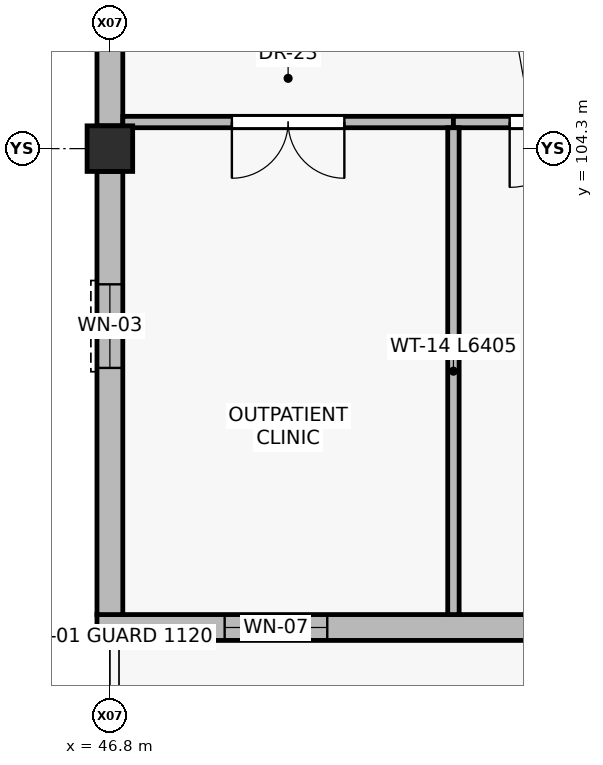
"""IFC4 building model, lengths in metres.
Left out: names, types, materials, properties, quantities, classifications, styles, units other than length and angle.
Written with IfcOpenShell. Run it as: python <this file> out.ifc"""

import sys

from ifc_helpers import new_model, si_unit, direction, frame, frame_2d, origin, origin_2d, place, context, subcontext, project, spatial, rectangle, extrude, element, fill, save


model = new_model("IFC4")
c1 = context("Model", 3, precision=1e-05, world=origin(), true_north=direction((0.0, 1.0)))
c2 = subcontext(c1, "Body", "Model", "MODEL_VIEW")
j1 = project(units=[si_unit("LENGTHUNIT", "METRE"), si_unit("PLANEANGLEUNIT", "RADIAN")], contexts=[c1])
p1 = place(None, origin())
s1 = spatial("IfcSite", under=j1, at=p1, CompositionType="ELEMENT")
p2 = place(p1, origin())
s2 = spatial("IfcBuilding", under=s1, at=p2, CompositionType="ELEMENT")
p3 = place(p2, frame((0.0, 0.0, 4.8)))
s3 = spatial("IfcBuildingStorey", under=s2, at=p3, CompositionType="ELEMENT", Elevation=4.8)
p4 = place(p3, frame((46.8, 104.3, 0.0), z_axis=(0.0, 0.0, 1.0), x_axis=(1.0, 0.0, 0.0)))
e1 = element("IfcColumn", 1, at=p4, inside=s3, PredefinedType="COLUMN", context=c2, shape_type="SweptSolid", body=[
    extrude(rectangle(XDim=0.6, YDim=0.6, at=origin_2d()), origin(), (0.0, 0.0, 1.0), 4.8),
])
p5 = place(p3, frame((54.6, 98.0, 0.0), z_axis=(0.0, 0.0, 1.0), x_axis=(-1.0, 0.0, 0.0)))
e2 = element("IfcWall", 2, at=p5, inside=s3, PredefinedType="STANDARD", context=c2, shape_type="SweptSolid", body=[
    extrude(rectangle(XDim=7.97, YDim=0.34, at=frame_2d((3.985, 0.0))), origin(), (0.0, 0.0, 1.0), 4.54),
])
p6 = place(p5, frame((1.05, 0.0, 0.9)))
e3 = element("IfcOpeningElement", 3, at=p6, cuts=e2, PredefinedType="OPENING", context=c2, shape_type="SweptSolid", body=[
    extrude(rectangle(XDim=1.2, YDim=2.1, at=frame_2d((0.6, 1.05))), frame((0.0, 0.18, 0.0), z_axis=(0.0, -1.0, 0.0), x_axis=(1.0, 0.0, 0.0)), (0.0, 0.0, 1.0), 0.36),
])
p7 = place(p5, frame((4.94, 0.0, 0.9)))
e4 = element("IfcOpeningElement", 4, at=p7, cuts=e2, PredefinedType="OPENING", context=c2, shape_type="SweptSolid", body=[
    extrude(rectangle(XDim=1.35, YDim=1.75, at=frame_2d((0.675, 0.875))), frame((0.0, 0.18, 0.0), z_axis=(0.0, -1.0, 0.0), x_axis=(1.0, 0.0, 0.0)), (0.0, 0.0, 1.0), 0.36),
])
p8 = place(p3, frame((46.8, 98.17, 0.0), z_axis=(0.0, 0.0, 1.0), x_axis=(0.0, 1.0, 0.0)))
e5 = element("IfcWall", 5, at=p8, inside=s3, PredefinedType="STANDARD", context=c2, shape_type="SweptSolid", body=[
    extrude(rectangle(XDim=5.83, YDim=0.34, at=frame_2d((2.915, 0.0))), origin(), (0.0, 0.0, 1.0), 4.14),
])
p9 = place(p8, frame((3.245, 0.0, 0.9)))
e6 = element("IfcOpeningElement", 6, at=p9, cuts=e5, PredefinedType="OPENING", context=c2, shape_type="SweptSolid", body=[
    extrude(rectangle(XDim=1.1, YDim=1.6, at=frame_2d((0.55, 0.8))), frame((0.0, 0.18, 0.0), z_axis=(0.0, -1.0, 0.0), x_axis=(1.0, 0.0, 0.0)), (0.0, 0.0, 1.0), 0.36),
])
p10 = place(p3, frame((46.8, 104.6, 0.0), z_axis=(0.0, 0.0, 1.0), x_axis=(0.0, 1.0, 0.0)))
e7 = element("IfcWall", 7, at=p10, inside=s3, PredefinedType="STANDARD", context=c2, shape_type="SweptSolid", body=[
    extrude(rectangle(XDim=3.3, YDim=0.34, at=frame_2d((1.65, 0.0))), origin(), (0.0, 0.0, 1.0), 4.14),
])
p11 = place(p10, frame((1.125, 0.0, 0.9)))
e8 = element("IfcOpeningElement", 8, at=p11, cuts=e7, PredefinedType="OPENING", context=c2, shape_type="SweptSolid", body=[
    extrude(rectangle(XDim=1.05, YDim=1.65, at=frame_2d((0.525, 0.825))), frame((0.0, 0.18, 0.0), z_axis=(0.0, -1.0, 0.0), x_axis=(1.0, 0.0, 0.0)), (0.0, 0.0, 1.0), 0.36),
])
p12 = place(p3, frame((51.32, 104.65, 0.0), z_axis=(0.0, 0.0, 1.0), x_axis=(-1.0, 0.0, 0.0)))
e9 = element("IfcWall", 9, at=p12, inside=s3, PredefinedType="PARTITIONING", context=c2, shape_type="SweptSolid", body=[
    extrude(rectangle(XDim=4.35, YDim=0.15, at=frame_2d((2.175, 0.0))), origin(), (0.0, 0.0, 1.0), 4.04),
])
p13 = place(p12, frame((1.435, 0.0, 0.0)))
e10 = element("IfcOpeningElement", 10, at=p13, cuts=e9, PredefinedType="OPENING", context=c2, shape_type="SweptSolid", body=[
    extrude(rectangle(XDim=1.48, YDim=2.25, at=frame_2d((0.74, 1.125))), frame((0.0, 0.085, 0.0), z_axis=(0.0, -1.0, 0.0), x_axis=(1.0, 0.0, 0.0)), (0.0, 0.0, 1.0), 0.17),
])
p14 = place(p3, frame((57.72, 104.65, 0.0), z_axis=(0.0, 0.0, 1.0), x_axis=(-1.0, 0.0, 0.0)))
e11 = element("IfcWall", 11, at=p14, inside=s3, PredefinedType="PARTITIONING", context=c2, shape_type="SweptSolid", body=[
    extrude(rectangle(XDim=6.4, YDim=0.15, at=frame_2d((3.2, 0.0))), origin(), (0.0, 0.0, 1.0), 4.04),
])
p15 = place(p14, frame((3.94, 0.0, 0.0)))
e12 = element("IfcOpeningElement", 12, at=p15, cuts=e11, PredefinedType="OPENING", context=c2, shape_type="SweptSolid", body=[
    extrude(rectangle(XDim=1.72, YDim=2.3, at=frame_2d((0.86, 1.15))), frame((0.0, 0.085, 0.0), z_axis=(0.0, -1.0, 0.0), x_axis=(1.0, 0.0, 0.0)), (0.0, 0.0, 1.0), 0.17),
])
p16 = place(p3, frame((51.32, 98.17, 0.0), z_axis=(0.0, 0.0, 1.0), x_axis=(0.0, 1.0, 0.0)))
e13 = element("IfcWall", 13, at=p16, inside=s3, PredefinedType="PARTITIONING", context=c2, shape_type="SweptSolid", body=[
    extrude(rectangle(XDim=6.405, YDim=0.15, at=frame_2d((3.203, 0.0))), origin(), (0.0, 0.0, 1.0), 4.54),
])
p17 = place(p7, origin())
e14 = element("IfcWindow", 14, at=p17, inside=s3, PartitioningType="SINGLE_PANEL", PredefinedType="WINDOW", context=c2, shape_type="SweptSolid", body=[
    extrude(rectangle(XDim=1.35, YDim=1.75, at=frame_2d((0.675, 0.875))), frame((0.0, 0.03, 0.0), z_axis=(0.0, -1.0, 0.0), x_axis=(1.0, 0.0, 0.0)), (0.0, 0.0, 1.0), 0.06),
])
fill(e4, e14)
p18 = place(p9, origin())
e15 = element("IfcWindow", 15, at=p18, inside=s3, PartitioningType="SINGLE_PANEL", PredefinedType="WINDOW", context=c2, shape_type="SweptSolid", body=[
    extrude(rectangle(XDim=1.1, YDim=1.6, at=frame_2d((0.55, 0.8))), frame((0.0, 0.03, 0.0), z_axis=(0.0, -1.0, 0.0), x_axis=(1.0, 0.0, 0.0)), (0.0, 0.0, 1.0), 0.06),
])
fill(e6, e15)
p19 = place(p13, origin())
e16 = element("IfcDoor", 16, at=p19, inside=s3, OperationType="DOUBLE_DOOR_SINGLE_SWING", PredefinedType="DOOR", context=c2, shape_type="SweptSolid", body=[
    extrude(rectangle(XDim=1.48, YDim=2.25, at=frame_2d((0.74, 1.125))), frame((0.0, 0.025, 0.0), z_axis=(0.0, -1.0, 0.0), x_axis=(1.0, 0.0, 0.0)), (0.0, 0.0, 1.0), 0.05),
])
fill(e10, e16)
p20 = place(p15, origin())
e17 = element("IfcDoor", 17, at=p20, inside=s3, OperationType="DOUBLE_DOOR_SINGLE_SWING", PredefinedType="DOOR", context=c2, shape_type="SweptSolid", body=[
    extrude(rectangle(XDim=1.72, YDim=2.3, at=frame_2d((0.86, 1.15))), frame((0.0, 0.025, 0.0), z_axis=(0.0, -1.0, 0.0), x_axis=(1.0, 0.0, 0.0)), (0.0, 0.0, 1.0), 0.05),
])
fill(e12, e17)
save(model, sys.argv[1])
